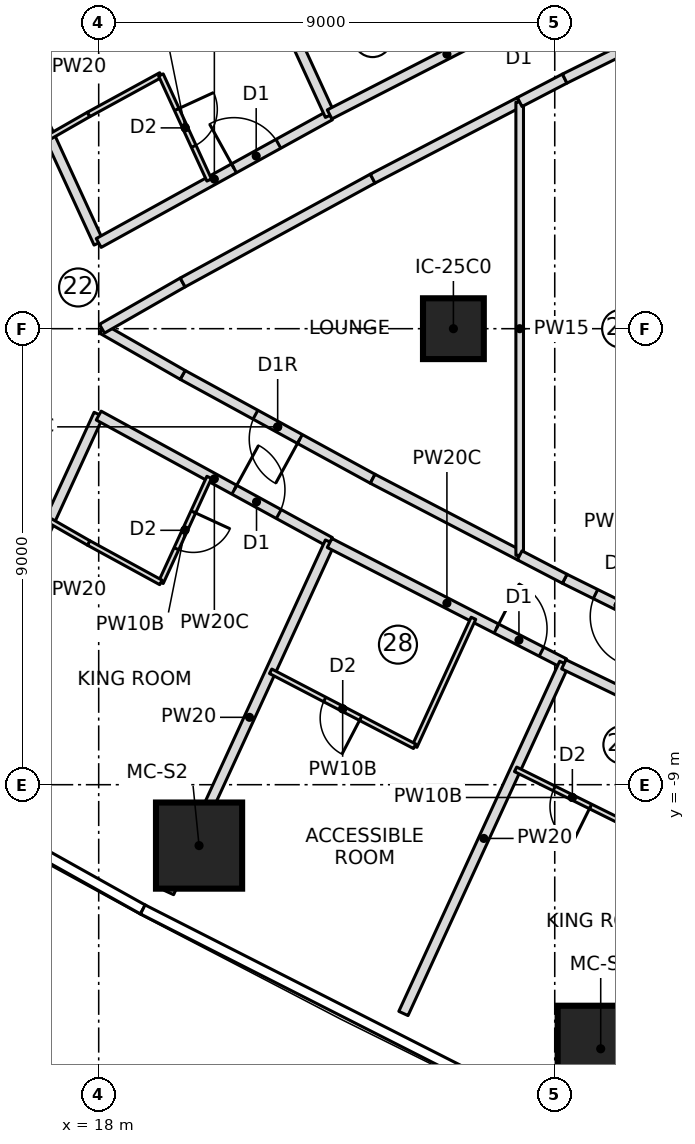
"""IFC4 building model, lengths in metres.
Left out: names, types, materials, properties, quantities, classifications, styles, units other than length and angle.
Written with IfcOpenShell. Run it as: python <this file> out.ifc"""

import sys

from ifc_helpers import new_model, si_unit, direction, frame, frame_2d, origin, origin_2d, place, context, subcontext, project, spatial, rectangle, extrude, element, fill, save


model = new_model("IFC4")
c1 = context("Model", 3, precision=1e-05, world=origin(), true_north=direction((0.0, 1.0)))
c2 = subcontext(c1, "Body", "Model", "MODEL_VIEW")
j1 = project(units=[si_unit("LENGTHUNIT", "METRE"), si_unit("PLANEANGLEUNIT", "RADIAN")], contexts=[c1])
p1 = place(None, origin())
s1 = spatial("IfcSite", under=j1, at=p1, CompositionType="ELEMENT")
p2 = place(p1, origin())
s2 = spatial("IfcBuilding", under=s1, at=p2, CompositionType="ELEMENT")
p3 = place(p2, frame((0.0, 0.0, 116.85)))
s3 = spatial("IfcBuildingStorey", under=s2, at=p3, CompositionType="ELEMENT", Elevation=116.85)
for number, where, z_axis, x_axis in (
    (1, (19.981, -10.202, 0.0), (0.0, 0.0, 1.0), (1.0, 0.0, 0.0)),
    (2, (27.907, -14.212, 0.0), (0.0, 0.0, 1.0), (1.0, 0.0, 0.0)),
):
    element("IfcColumn", number, at=place(p3, frame(where, z_axis=z_axis, x_axis=x_axis)), inside=s3, PredefinedType="COLUMN", context=c2, shape_type="SweptSolid", body=[
        extrude(rectangle(XDim=1.7, YDim=1.7, at=origin_2d()), origin(), (0.0, 0.0, 1.0), 3.55),
    ])
p4 = place(p3, frame((25.0, 0.0, 0.0), z_axis=(0.0, 0.0, 1.0), x_axis=(1.0, 0.0, 0.0)))
e3 = element("IfcColumn", 3, at=p4, inside=s3, PredefinedType="COLUMN", context=c2, shape_type="SweptSolid", body=[
    extrude(rectangle(XDim=1.2, YDim=1.2, at=origin_2d()), origin(), (0.0, 0.0, 1.0), 3.55),
])
p5 = place(p3, frame((14.815, 8.626, 0.0), z_axis=(0.0, 0.0, 1.0), x_axis=(0.417432341259, -0.908708006166, 0.0)))
e4 = element("IfcWall", 4, at=p5, inside=s3, PredefinedType="PARTITIONING", context=c2, shape_type="SweptSolid", body=[
    extrude(rectangle(XDim=7.631, YDim=0.2, at=frame_2d((3.815, 0.0))), origin(), (0.0, 0.0, 1.0), 3.15),
])
p6 = place(p3, frame((18.0, 1.692, 0.0), z_axis=(0.0, 0.0, 1.0), x_axis=(0.875501185112, 0.483215971246, 0.0)))
e5 = element("IfcWall", 5, at=p6, inside=s3, PredefinedType="PARTITIONING", context=c2, shape_type="SweptSolid", body=[
    extrude(rectangle(XDim=5.214, YDim=0.2, at=frame_2d((2.607, 0.0))), origin(), (0.0, 0.0, 1.0), 3.15),
])
p7 = place(p6, frame((3.05, 0.0, 0.0)))
e6 = element("IfcOpeningElement", 6, at=p7, cuts=e5, PredefinedType="OPENING", context=c2, shape_type="SweptSolid", body=[
    extrude(rectangle(XDim=1.0, YDim=2.1, at=frame_2d((0.5, 1.05))), frame((0.0, 0.11, 0.0), z_axis=(0.0, -1.0, 0.0), x_axis=(1.0, 0.0, 0.0)), (0.0, 0.0, 1.0), 0.22),
])
p8 = place(p3, frame((17.036, 3.79, 0.0), z_axis=(0.0, 0.0, 1.0), x_axis=(0.867629162742, 0.497211862248, 0.0)))
e7 = element("IfcWall", 7, at=p8, inside=s3, PredefinedType="PARTITIONING", context=c2, shape_type="SweptSolid", body=[
    extrude(rectangle(XDim=0.882, YDim=0.1, at=frame_2d((0.441, 0.0))), origin(), (0.0, 0.0, 1.0), 3.15),
])
p9 = place(p3, frame((17.801, 4.229, 0.0), z_axis=(0.0, 0.0, 1.0), x_axis=(0.877424481957, 0.479714788663, 0.0)))
e8 = element("IfcWall", 8, at=p9, inside=s3, PredefinedType="PARTITIONING", context=c2, shape_type="SweptSolid", body=[
    extrude(rectangle(XDim=1.625, YDim=0.1, at=frame_2d((0.813, 0.0))), origin(), (0.0, 0.0, 1.0), 3.15),
])
p10 = place(p3, frame((19.228, 5.008, 0.0), z_axis=(0.0, 0.0, 1.0), x_axis=(0.417450047292, -0.908699872354, 0.0)))
e9 = element("IfcWall", 9, at=p10, inside=s3, PredefinedType="PARTITIONING", context=c2, shape_type="SweptSolid", body=[
    extrude(rectangle(XDim=2.283, YDim=0.1, at=frame_2d((1.141, 0.0))), origin(), (0.0, 0.0, 1.0), 3.15),
])
p11 = place(p10, frame((0.75, 0.0, 0.0)))
e10 = element("IfcOpeningElement", 10, at=p11, cuts=e9, PredefinedType="OPENING", context=c2, shape_type="SweptSolid", body=[
    extrude(rectangle(XDim=0.8, YDim=2.1, at=frame_2d((0.4, 1.05))), frame((0.0, 0.06, 0.0), z_axis=(0.0, -1.0, 0.0), x_axis=(1.0, 0.0, 0.0)), (0.0, 0.0, 1.0), 0.12),
])
p12 = place(p3, frame((22.565, 4.211, 0.0), z_axis=(0.0, 0.0, 1.0), x_axis=(-0.41742645501, 0.908710710104, 0.0)))
e11 = element("IfcWall", 11, at=p12, inside=s3, PredefinedType="PARTITIONING", context=c2, shape_type="SweptSolid", body=[
    extrude(rectangle(XDim=7.613, YDim=0.2, at=frame_2d((3.806, 0.0))), origin(), (0.0, 0.0, 1.0), 3.15),
])
p13 = place(p3, frame((22.557, 4.229, 0.0), z_axis=(0.0, 0.0, 1.0), x_axis=(0.889706581948, 0.456532800617, 0.0)))
e12 = element("IfcWall", 12, at=p13, inside=s3, PredefinedType="PARTITIONING", context=c2, shape_type="SweptSolid", body=[
    extrude(rectangle(XDim=5.205, YDim=0.2, at=frame_2d((2.603, 0.0))), origin(), (0.0, 0.0, 1.0), 3.15),
])
p14 = place(p13, frame((3.7, 0.0, 0.0)))
e13 = element("IfcOpeningElement", 13, at=p14, cuts=e12, PredefinedType="OPENING", context=c2, shape_type="SweptSolid", body=[
    extrude(rectangle(XDim=1.0, YDim=2.1, at=frame_2d((0.5, 1.05))), frame((0.0, 0.11, 0.0), z_axis=(0.0, -1.0, 0.0), x_axis=(1.0, 0.0, 0.0)), (0.0, 0.0, 1.0), 0.22),
])
p15 = place(p3, frame((14.815, -8.626, 0.0), z_axis=(0.0, 0.0, 1.0), x_axis=(0.417432341259, 0.908708006166, 0.0)))
e14 = element("IfcWall", 14, at=p15, inside=s3, PredefinedType="PARTITIONING", context=c2, shape_type="SweptSolid", body=[
    extrude(rectangle(XDim=7.631, YDim=0.2, at=frame_2d((3.815, 0.0))), origin(), (0.0, 0.0, 1.0), 3.15),
])
p16 = place(p3, frame((18.0, -1.715, 0.0), z_axis=(0.0, 0.0, 1.0), x_axis=(0.877360645448, -0.479831530664, 0.0)))
e15 = element("IfcWall", 15, at=p16, inside=s3, PredefinedType="PARTITIONING", context=c2, shape_type="SweptSolid", body=[
    extrude(rectangle(XDim=5.203, YDim=0.2, at=frame_2d((2.602, 0.0))), origin(), (0.0, 0.0, 1.0), 3.15),
])
p17 = place(p16, frame((3.05, 0.0, 0.0)))
e16 = element("IfcOpeningElement", 16, at=p17, cuts=e15, PredefinedType="OPENING", context=c2, shape_type="SweptSolid", body=[
    extrude(rectangle(XDim=1.0, YDim=2.1, at=frame_2d((0.5, 1.05))), frame((0.0, 0.11, 0.0), z_axis=(0.0, -1.0, 0.0), x_axis=(1.0, 0.0, 0.0)), (0.0, 0.0, 1.0), 0.22),
])
p18 = place(p3, frame((20.18, -2.934, 0.0), z_axis=(0.0, 0.0, 1.0), x_axis=(-0.417450047292, -0.908699872354, 0.0)))
e17 = element("IfcWall", 17, at=p18, inside=s3, PredefinedType="PARTITIONING", context=c2, shape_type="SweptSolid", body=[
    extrude(rectangle(XDim=2.283, YDim=0.1, at=frame_2d((1.141, 0.0))), origin(), (0.0, 0.0, 1.0), 3.15),
])
p19 = place(p18, frame((0.75, 0.0, 0.0)))
e18 = element("IfcOpeningElement", 18, at=p19, cuts=e17, PredefinedType="OPENING", context=c2, shape_type="SweptSolid", body=[
    extrude(rectangle(XDim=0.8, YDim=2.1, at=frame_2d((0.4, 1.05))), frame((0.0, 0.06, 0.0), z_axis=(0.0, -1.0, 0.0), x_axis=(1.0, 0.0, 0.0)), (0.0, 0.0, 1.0), 0.12),
])
p20 = place(p3, frame((19.228, -5.008, 0.0), z_axis=(0.0, 0.0, 1.0), x_axis=(-0.877424481957, 0.479714788663, 0.0)))
e19 = element("IfcWall", 19, at=p20, inside=s3, PredefinedType="PARTITIONING", context=c2, shape_type="SweptSolid", body=[
    extrude(rectangle(XDim=1.625, YDim=0.1, at=frame_2d((0.813, 0.0))), origin(), (0.0, 0.0, 1.0), 3.15),
])
p21 = place(p3, frame((17.801, -4.229, 0.0), z_axis=(0.0, 0.0, 1.0), x_axis=(-0.867629162742, 0.497211862248, 0.0)))
e20 = element("IfcWall", 20, at=p21, inside=s3, PredefinedType="PARTITIONING", context=c2, shape_type="SweptSolid", body=[
    extrude(rectangle(XDim=0.882, YDim=0.1, at=frame_2d((0.441, 0.0))), origin(), (0.0, 0.0, 1.0), 3.15),
])
p22 = place(p3, frame((19.387, -11.129, 0.0), z_axis=(0.0, 0.0, 1.0), x_axis=(0.41742645501, 0.908710710104, 0.0)))
e21 = element("IfcWall", 21, at=p22, inside=s3, PredefinedType="PARTITIONING", context=c2, shape_type="SweptSolid", body=[
    extrude(rectangle(XDim=7.613, YDim=0.2, at=frame_2d((3.806, 0.0))), origin(), (0.0, 0.0, 1.0), 3.15),
])
p23 = place(p3, frame((22.557, -4.229, 0.0), z_axis=(0.0, 0.0, 1.0), x_axis=(0.889706581948, -0.456532800617, 0.0)))
e22 = element("IfcWall", 22, at=p23, inside=s3, PredefinedType="PARTITIONING", context=c2, shape_type="SweptSolid", body=[
    extrude(rectangle(XDim=5.205, YDim=0.2, at=frame_2d((2.603, 0.0))), origin(), (0.0, 0.0, 1.0), 3.15),
])
p24 = place(p23, frame((3.7, 0.0, 0.0)))
e23 = element("IfcOpeningElement", 23, at=p24, cuts=e22, PredefinedType="OPENING", context=c2, shape_type="SweptSolid", body=[
    extrude(rectangle(XDim=1.0, YDim=2.1, at=frame_2d((0.5, 1.05))), frame((0.0, 0.11, 0.0), z_axis=(0.0, -1.0, 0.0), x_axis=(1.0, 0.0, 0.0)), (0.0, 0.0, 1.0), 0.22),
])
p25 = place(p3, frame((25.396, -5.715, 0.0), z_axis=(0.0, 0.0, 1.0), x_axis=(-0.417359077977, -0.908741657475, 0.0)))
e24 = element("IfcWall", 24, at=p25, inside=s3, PredefinedType="PARTITIONING", context=c2, shape_type="SweptSolid", body=[
    extrude(rectangle(XDim=2.78, YDim=0.1, at=frame_2d((1.39, 0.0))), origin(), (0.0, 0.0, 1.0), 3.15),
])
p26 = place(p3, frame((24.235, -8.242, 0.0), z_axis=(0.0, 0.0, 1.0), x_axis=(-0.886897171809, 0.461966889114, 0.0)))
e25 = element("IfcWall", 25, at=p26, inside=s3, PredefinedType="PARTITIONING", context=c2, shape_type="SweptSolid", body=[
    extrude(rectangle(XDim=3.204, YDim=0.1, at=frame_2d((1.602, 0.0))), origin(), (0.0, 0.0, 1.0), 3.15),
])
p27 = place(p26, frame((1.2, 0.0, 0.0)))
e26 = element("IfcOpeningElement", 26, at=p27, cuts=e25, PredefinedType="OPENING", context=c2, shape_type="SweptSolid", body=[
    extrude(rectangle(XDim=0.8, YDim=2.1, at=frame_2d((0.4, 1.05))), frame((0.0, 0.06, 0.0), z_axis=(0.0, -1.0, 0.0), x_axis=(1.0, 0.0, 0.0)), (0.0, 0.0, 1.0), 0.12),
])
p28 = place(p3, frame((24.014, -13.515, 0.0), z_axis=(0.0, 0.0, 1.0), x_axis=(0.417428513692, 0.908709764422, 0.0)))
e27 = element("IfcWall", 27, at=p28, inside=s3, PredefinedType="PARTITIONING", context=c2, shape_type="SweptSolid", body=[
    extrude(rectangle(XDim=7.603, YDim=0.2, at=frame_2d((3.802, 0.0))), origin(), (0.0, 0.0, 1.0), 3.15),
])
p29 = place(p3, frame((27.179, -6.624, 0.0), z_axis=(0.0, 0.0, 1.0), x_axis=(0.900446408639, -0.434966970204, 0.0)))
e28 = element("IfcWall", 28, at=p29, inside=s3, PredefinedType="PARTITIONING", context=c2, shape_type="SweptSolid", body=[
    extrude(rectangle(XDim=5.201, YDim=0.2, at=frame_2d((2.601, 0.0))), origin(), (0.0, 0.0, 1.0), 3.15),
])
p30 = place(p29, frame((3.05, 0.0, 0.0)))
e29 = element("IfcOpeningElement", 29, at=p30, cuts=e28, PredefinedType="OPENING", context=c2, shape_type="SweptSolid", body=[
    extrude(rectangle(XDim=1.0, YDim=2.1, at=frame_2d((0.5, 1.05))), frame((0.0, 0.11, 0.0), z_axis=(0.0, -1.0, 0.0), x_axis=(1.0, 0.0, 0.0)), (0.0, 0.0, 1.0), 0.22),
])
p31 = place(p3, frame((28.468, -9.807, 0.0), z_axis=(0.0, 0.0, 1.0), x_axis=(-0.895944857815, 0.444165297784, 0.0)))
e30 = element("IfcWall", 30, at=p31, inside=s3, PredefinedType="PARTITIONING", context=c2, shape_type="SweptSolid", body=[
    extrude(rectangle(XDim=2.501, YDim=0.1, at=frame_2d((1.25, 0.0))), origin(), (0.0, 0.0, 1.0), 3.15),
])
p32 = place(p31, frame((0.85, 0.0, 0.0)))
e31 = element("IfcOpeningElement", 31, at=p32, cuts=e30, PredefinedType="OPENING", context=c2, shape_type="SweptSolid", body=[
    extrude(rectangle(XDim=0.8, YDim=2.1, at=frame_2d((0.4, 1.05))), frame((0.0, 0.06, 0.0), z_axis=(0.0, -1.0, 0.0), x_axis=(1.0, 0.0, 0.0)), (0.0, 0.0, 1.0), 0.12),
])
p33 = place(p3, frame((23.407, -2.962, 0.0), z_axis=(0.0, 0.0, 1.0), x_axis=(-0.877465075585, 0.479640533242, 0.0)))
e32 = element("IfcWall", 32, at=p33, inside=s3, PredefinedType="PARTITIONING", context=c2, shape_type="SweptSolid", body=[
    extrude(rectangle(XDim=4.273, YDim=0.2, at=frame_2d((2.137, 0.0))), origin(), (0.0, 0.0, 1.0), 3.15),
])
p34 = place(p33, frame((1.636, 0.0, 0.0)))
e33 = element("IfcOpeningElement", 33, at=p34, cuts=e32, PredefinedType="OPENING", context=c2, shape_type="SweptSolid", body=[
    extrude(rectangle(XDim=1.0, YDim=2.1, at=frame_2d((0.5, 1.05))), frame((0.0, 0.11, 0.0), z_axis=(0.0, -1.0, 0.0), x_axis=(1.0, 0.0, 0.0)), (0.0, 0.0, 1.0), 0.22),
])
for number, where, z_axis, x_axis in (
    (34, (19.657, -0.912, 0.0), (0.0, 0.0, 1.0), (-0.868, 0.497, 0.0)),
    (35, (18.065, 0.0, 0.0), (0.0, 0.0, 1.0), (0.868, 0.497, 0.0)),
):
    element("IfcWall", number, at=place(p3, frame(where, z_axis=z_axis, x_axis=x_axis)), inside=s3, PredefinedType="PARTITIONING", context=c2, shape_type="SweptSolid", body=[
        extrude(rectangle(XDim=1.835, YDim=0.2, at=frame_2d((0.918, 0.0))), origin(), (0.0, 0.0, 1.0), 3.15),
    ])
p35 = place(p3, frame((19.657, 0.912, 0.0), z_axis=(0.0, 0.0, 1.0), x_axis=(0.877465075585, 0.479640533242, 0.0)))
e36 = element("IfcWall", 36, at=p35, inside=s3, PredefinedType="PARTITIONING", context=c2, shape_type="SweptSolid", body=[
    extrude(rectangle(XDim=4.273, YDim=0.2, at=frame_2d((2.137, 0.0))), origin(), (0.0, 0.0, 1.0), 3.15),
])
for number, where, z_axis, x_axis in (
    (37, (23.407, 2.962, 0.0), (0.0, 0.0, 1.0), (0.887, 0.462, 0.0)),
    (38, (26.308, -4.473, 0.0), (0.0, 0.0, 1.0), (-0.887, 0.462, 0.0)),
):
    element("IfcWall", number, at=place(p3, frame(where, z_axis=z_axis, x_axis=x_axis)), inside=s3, PredefinedType="PARTITIONING", context=c2, shape_type="SweptSolid", body=[
        extrude(rectangle(XDim=3.271, YDim=0.2, at=frame_2d((1.636, 0.0))), origin(), (0.0, 0.0, 1.0), 3.15),
    ])
p36 = place(p3, frame((26.308, -4.473, 0.0), z_axis=(0.0, 0.0, 1.0), x_axis=(0.0, 1.0, 0.0)))
e39 = element("IfcWall", 39, at=p36, inside=s3, PredefinedType="PARTITIONING", context=c2, shape_type="SweptSolid", body=[
    extrude(rectangle(XDim=8.946, YDim=0.15, at=frame_2d((4.473, 0.0))), origin(), (0.0, 0.0, 1.0), 3.15),
])
p37 = place(p3, frame((29.308, -5.983, 0.0), z_axis=(0.0, 0.0, 1.0), x_axis=(-0.895954899574, 0.444145041546, 0.0)))
e40 = element("IfcWall", 40, at=p37, inside=s3, PredefinedType="PARTITIONING", context=c2, shape_type="SweptSolid", body=[
    extrude(rectangle(XDim=2.357, YDim=0.2, at=frame_2d((1.179, 0.0))), origin(), (0.0, 0.0, 1.0), 3.15),
])
p38 = place(p37, frame((0.678, 0.0, 0.0)))
e41 = element("IfcOpeningElement", 41, at=p38, cuts=e40, PredefinedType="OPENING", context=c2, shape_type="SweptSolid", body=[
    extrude(rectangle(XDim=1.0, YDim=2.1, at=frame_2d((0.5, 1.05))), frame((0.0, 0.11, 0.0), z_axis=(0.0, -1.0, 0.0), x_axis=(1.0, 0.0, 0.0)), (0.0, 0.0, 1.0), 0.22),
])
for number, where, z_axis, x_axis in (
    (42, (27.196, -4.936, 0.0), (0.0, 0.0, 1.0), (-0.887, 0.462, 0.0)),
    (43, (26.308, 4.473, 0.0), (0.0, 0.0, 1.0), (0.887, 0.462, 0.0)),
):
    element("IfcWall", number, at=place(p3, frame(where, z_axis=z_axis, x_axis=x_axis)), inside=s3, PredefinedType="PARTITIONING", context=c2, shape_type="SweptSolid", body=[
        extrude(rectangle(XDim=1.001, YDim=0.2, at=frame_2d((0.501, 0.0))), origin(), (0.0, 0.0, 1.0), 3.15),
    ])
p39 = place(p3, frame((27.196, 4.936, 0.0), z_axis=(0.0, 0.0, 1.0), x_axis=(0.895954899574, 0.444145041546, 0.0)))
e44 = element("IfcWall", 44, at=p39, inside=s3, PredefinedType="PARTITIONING", context=c2, shape_type="SweptSolid", body=[
    extrude(rectangle(XDim=2.357, YDim=0.2, at=frame_2d((1.179, 0.0))), origin(), (0.0, 0.0, 1.0), 3.15),
])
p40 = place(p11, origin())
e45 = element("IfcDoor", 45, at=p40, inside=s3, OperationType="SINGLE_SWING_LEFT", PredefinedType="DOOR", context=c2, shape_type="SweptSolid", body=[
    extrude(rectangle(XDim=0.8, YDim=2.1, at=frame_2d((0.4, 1.05))), frame((0.0, 0.025, 0.0), z_axis=(0.0, -1.0, 0.0), x_axis=(1.0, 0.0, 0.0)), (0.0, 0.0, 1.0), 0.05),
])
fill(e10, e45)
p41 = place(p7, origin())
e46 = element("IfcDoor", 46, at=p41, inside=s3, OperationType="SINGLE_SWING_LEFT", PredefinedType="DOOR", context=c2, shape_type="SweptSolid", body=[
    extrude(rectangle(XDim=1.0, YDim=2.1, at=frame_2d((0.5, 1.05))), frame((0.0, 0.025, 0.0), z_axis=(0.0, -1.0, 0.0), x_axis=(1.0, 0.0, 0.0)), (0.0, 0.0, 1.0), 0.05),
])
fill(e6, e46)
p42 = place(p19, origin())
e47 = element("IfcDoor", 47, at=p42, inside=s3, OperationType="SINGLE_SWING_LEFT", PredefinedType="DOOR", context=c2, shape_type="SweptSolid", body=[
    extrude(rectangle(XDim=0.8, YDim=2.1, at=frame_2d((0.4, 1.05))), frame((0.0, 0.025, 0.0), z_axis=(0.0, -1.0, 0.0), x_axis=(1.0, 0.0, 0.0)), (0.0, 0.0, 1.0), 0.05),
])
fill(e18, e47)
p43 = place(p17, origin())
e48 = element("IfcDoor", 48, at=p43, inside=s3, OperationType="SINGLE_SWING_LEFT", PredefinedType="DOOR", context=c2, shape_type="SweptSolid", body=[
    extrude(rectangle(XDim=1.0, YDim=2.1, at=frame_2d((0.5, 1.05))), frame((0.0, 0.025, 0.0), z_axis=(0.0, -1.0, 0.0), x_axis=(1.0, 0.0, 0.0)), (0.0, 0.0, 1.0), 0.05),
])
fill(e16, e48)
p44 = place(p27, origin())
e49 = element("IfcDoor", 49, at=p44, inside=s3, OperationType="SINGLE_SWING_LEFT", PredefinedType="DOOR", context=c2, shape_type="SweptSolid", body=[
    extrude(rectangle(XDim=0.8, YDim=2.1, at=frame_2d((0.4, 1.05))), frame((0.0, 0.025, 0.0), z_axis=(0.0, -1.0, 0.0), x_axis=(1.0, 0.0, 0.0)), (0.0, 0.0, 1.0), 0.05),
])
fill(e26, e49)
p45 = place(p24, origin())
e50 = element("IfcDoor", 50, at=p45, inside=s3, OperationType="SINGLE_SWING_LEFT", PredefinedType="DOOR", context=c2, shape_type="SweptSolid", body=[
    extrude(rectangle(XDim=1.0, YDim=2.1, at=frame_2d((0.5, 1.05))), frame((0.0, 0.025, 0.0), z_axis=(0.0, -1.0, 0.0), x_axis=(1.0, 0.0, 0.0)), (0.0, 0.0, 1.0), 0.05),
])
fill(e23, e50)
p46 = place(p32, origin())
e51 = element("IfcDoor", 51, at=p46, inside=s3, OperationType="SINGLE_SWING_LEFT", PredefinedType="DOOR", context=c2, shape_type="SweptSolid", body=[
    extrude(rectangle(XDim=0.8, YDim=2.1, at=frame_2d((0.4, 1.05))), frame((0.0, 0.025, 0.0), z_axis=(0.0, -1.0, 0.0), x_axis=(1.0, 0.0, 0.0)), (0.0, 0.0, 1.0), 0.05),
])
fill(e31, e51)
p47 = place(p34, origin())
e52 = element("IfcDoor", 52, at=p47, inside=s3, OperationType="SINGLE_SWING_RIGHT", PredefinedType="DOOR", context=c2, shape_type="SweptSolid", body=[
    extrude(rectangle(XDim=1.0, YDim=2.1, at=frame_2d((0.5, 1.05))), frame((0.0, 0.025, 0.0), z_axis=(0.0, -1.0, 0.0), x_axis=(1.0, 0.0, 0.0)), (0.0, 0.0, 1.0), 0.05),
])
fill(e33, e52)
p48 = place(p38, origin())
e53 = element("IfcDoor", 53, at=p48, inside=s3, OperationType="SINGLE_SWING_LEFT", PredefinedType="DOOR", context=c2, shape_type="SweptSolid", body=[
    extrude(rectangle(XDim=1.0, YDim=2.1, at=frame_2d((0.5, 1.05))), frame((0.0, 0.025, 0.0), z_axis=(0.0, -1.0, 0.0), x_axis=(1.0, 0.0, 0.0)), (0.0, 0.0, 1.0), 0.05),
])
fill(e41, e53)
save(model, sys.argv[1])
